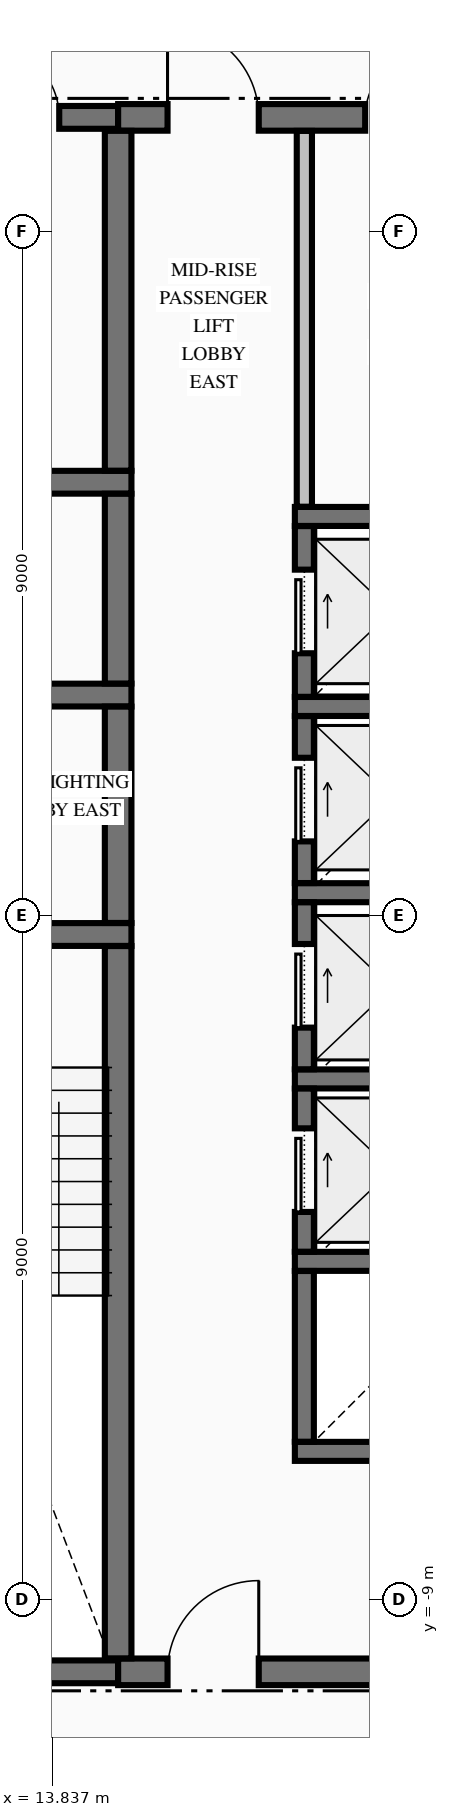
"""IFC4 building model, lengths in metres.
Left out: names, types, materials, properties, quantities, classifications, styles, units other than length and angle.
Written with IfcOpenShell. Run it as: python <this file> out.ifc"""

import sys

from ifc_helpers import new_model, si_unit, direction, frame, frame_2d, origin, place, context, subcontext, project, spatial, rectangle, extrude, element, fill, save


model = new_model("IFC4")
c1 = context("Model", 3, precision=1e-05, world=origin(), true_north=direction((0.0, 1.0)))
c2 = subcontext(c1, "Body", "Model", "MODEL_VIEW")
j1 = project(units=[si_unit("LENGTHUNIT", "METRE"), si_unit("PLANEANGLEUNIT", "RADIAN")], contexts=[c1])
p1 = place(None, origin())
s1 = spatial("IfcSite", under=j1, at=p1, CompositionType="ELEMENT")
p2 = place(p1, origin())
s2 = spatial("IfcBuilding", under=s1, at=p2, CompositionType="ELEMENT")
p3 = place(p2, frame((0.0, 0.0, 135.63)))
s3 = spatial("IfcBuildingStorey", under=s2, at=p3, CompositionType="ELEMENT", Elevation=135.63)
p4 = place(p3, frame((11.504, -9.95, 0.0), z_axis=(0.0, 0.0, 1.0), x_axis=(1.0, 0.0, 0.0)))
e1 = element("IfcWall", 1, at=p4, inside=s3, PredefinedType="SHEAR", context=c2, shape_type="SweptSolid", body=[
    extrude(rectangle(XDim=3.196, YDim=0.3, at=frame_2d((1.598, 0.0))), origin(), (0.0, 0.0, 1.0), 3.32),
])
p5 = place(p3, frame((14.7, -9.95, 0.0), z_axis=(0.0, 0.0, 1.0), x_axis=(1.0, 0.0, 0.0)))
e2 = element("IfcWall", 2, at=p5, inside=s3, PredefinedType="SHEAR", context=c2, shape_type="SweptSolid", body=[
    extrude(rectangle(XDim=4.796, YDim=0.35, at=frame_2d((2.398, 0.0))), origin(), (0.0, 0.0, 1.0), 3.32),
])
p6 = place(p5, frame((0.65, 0.0, 0.0)))
e3 = element("IfcOpeningElement", 3, at=p6, cuts=e2, PredefinedType="OPENING", context=c2, shape_type="SweptSolid", body=[
    extrude(rectangle(XDim=1.2, YDim=2.15, at=frame_2d((0.6, 1.075))), frame((0.0, 0.185, 0.0), z_axis=(0.0, -1.0, 0.0), x_axis=(1.0, 0.0, 0.0)), (0.0, 0.0, 1.0), 0.37),
])
for number, where, z_axis, x_axis in (
    (4, (17.025, -7.05, 0.0), (0.0, 0.0, 1.0), (1.0, 0.0, 0.0)),
    (5, (17.025, -4.55, 0.0), (0.0, 0.0, 1.0), (1.0, 0.0, 0.0)),
    (6, (17.025, -2.15, 0.0), (0.0, 0.0, 1.0), (1.0, 0.0, 0.0)),
):
    element("IfcWall", number, at=place(p3, frame(where, z_axis=z_axis, x_axis=x_axis)), inside=s3, PredefinedType="SOLIDWALL", context=c2, shape_type="SweptSolid", body=[
        extrude(rectangle(XDim=3.15, YDim=0.25, at=frame_2d((1.575, 0.0))), origin(), (0.0, 0.0, 1.0), 3.32),
    ])
p7 = place(p3, frame((11.504, -0.25, 0.0), z_axis=(0.0, 0.0, 1.0), x_axis=(1.0, 0.0, 0.0)))
e7 = element("IfcWall", 7, at=p7, inside=s3, PredefinedType="SHEAR", context=c2, shape_type="SweptSolid", body=[
    extrude(rectangle(XDim=3.371, YDim=0.3, at=frame_2d((1.686, 0.0))), origin(), (0.0, 0.0, 1.0), 3.32),
])
p8 = place(p7, frame((1.096, 0.0, 0.0)))
e8 = element("IfcOpeningElement", 8, at=p8, cuts=e7, PredefinedType="OPENING", context=c2, shape_type="SweptSolid", body=[
    extrude(rectangle(XDim=1.1, YDim=2.15, at=frame_2d((0.55, 1.075))), frame((0.0, 0.16, 0.0), z_axis=(0.0, -1.0, 0.0), x_axis=(1.0, 0.0, 0.0)), (0.0, 0.0, 1.0), 0.32),
])
p9 = place(p3, frame((17.025, 0.3, 0.0), z_axis=(0.0, 0.0, 1.0), x_axis=(1.0, 0.0, 0.0)))
e9 = element("IfcWall", 9, at=p9, inside=s3, PredefinedType="SOLIDWALL", context=c2, shape_type="SweptSolid", body=[
    extrude(rectangle(XDim=2.471, YDim=0.25, at=frame_2d((1.236, 0.0))), origin(), (0.0, 0.0, 1.0), 3.32),
])
p10 = place(p3, frame((17.025, 2.75, 0.0), z_axis=(0.0, 0.0, 1.0), x_axis=(1.0, 0.0, 0.0)))
e10 = element("IfcWall", 10, at=p10, inside=s3, PredefinedType="SOLIDWALL", context=c2, shape_type="SweptSolid", body=[
    extrude(rectangle(XDim=3.15, YDim=0.25, at=frame_2d((1.575, 0.0))), origin(), (0.0, 0.0, 1.0), 3.32),
])
p11 = place(p3, frame((10.85, 2.9, 0.0), z_axis=(0.0, 0.0, 1.0), x_axis=(1.0, 0.0, 0.0)))
e11 = element("IfcWall", 11, at=p11, inside=s3, PredefinedType="SHEAR", context=c2, shape_type="SweptSolid", body=[
    extrude(rectangle(XDim=4.025, YDim=0.3, at=frame_2d((2.012, 0.0))), origin(), (0.0, 0.0, 1.0), 3.32),
])
p12 = place(p11, frame((0.85, 0.0, 0.0)))
e12 = element("IfcOpeningElement", 12, at=p12, cuts=e11, PredefinedType="OPENING", context=c2, shape_type="SweptSolid", body=[
    extrude(rectangle(XDim=1.1, YDim=2.2, at=frame_2d((0.55, 1.1))), frame((0.0, 0.16, 0.0), z_axis=(0.0, -1.0, 0.0), x_axis=(1.0, 0.0, 0.0)), (0.0, 0.0, 1.0), 0.32),
])
p13 = place(p3, frame((17.025, 5.25, 0.0), z_axis=(0.0, 0.0, 1.0), x_axis=(1.0, 0.0, 0.0)))
e13 = element("IfcWall", 13, at=p13, inside=s3, PredefinedType="SOLIDWALL", context=c2, shape_type="SweptSolid", body=[
    extrude(rectangle(XDim=3.15, YDim=0.25, at=frame_2d((1.575, 0.0))), origin(), (0.0, 0.0, 1.0), 3.32),
])
p14 = place(p3, frame((10.85, 5.7, 0.0), z_axis=(0.0, 0.0, 1.0), x_axis=(1.0, 0.0, 0.0)))
e14 = element("IfcWall", 14, at=p14, inside=s3, PredefinedType="SHEAR", context=c2, shape_type="SweptSolid", body=[
    extrude(rectangle(XDim=4.025, YDim=0.3, at=frame_2d((2.012, 0.0))), origin(), (0.0, 0.0, 1.0), 3.32),
])
p15 = place(p3, frame((11.504, 10.5, 0.0), z_axis=(0.0, 0.0, 1.0), x_axis=(1.0, 0.0, 0.0)))
e15 = element("IfcWall", 15, at=p15, inside=s3, PredefinedType="SHEAR", context=c2, shape_type="SweptSolid", body=[
    extrude(rectangle(XDim=3.196, YDim=0.3, at=frame_2d((1.598, 0.0))), origin(), (0.0, 0.0, 1.0), 3.32),
])
p16 = place(p15, frame((1.471, 0.0, 0.0)))
e16 = element("IfcOpeningElement", 16, at=p16, cuts=e15, PredefinedType="OPENING", context=c2, shape_type="SweptSolid", body=[
    extrude(rectangle(XDim=0.95, YDim=2.15, at=frame_2d((0.475, 1.075))), frame((0.0, 0.16, 0.0), z_axis=(0.0, -1.0, 0.0), x_axis=(1.0, 0.0, 0.0)), (0.0, 0.0, 1.0), 0.32),
])
p17 = place(p3, frame((14.7, 10.5, 0.0), z_axis=(0.0, 0.0, 1.0), x_axis=(1.0, 0.0, 0.0)))
e17 = element("IfcWall", 17, at=p17, inside=s3, PredefinedType="SHEAR", context=c2, shape_type="SweptSolid", body=[
    extrude(rectangle(XDim=4.796, YDim=0.35, at=frame_2d((2.398, 0.0))), origin(), (0.0, 0.0, 1.0), 3.32),
])
p18 = place(p17, frame((0.65, 0.0, 0.0)))
e18 = element("IfcOpeningElement", 18, at=p18, cuts=e17, PredefinedType="OPENING", context=c2, shape_type="SweptSolid", body=[
    extrude(rectangle(XDim=1.2, YDim=2.15, at=frame_2d((0.6, 1.075))), frame((0.0, 0.185, 0.0), z_axis=(0.0, -1.0, 0.0), x_axis=(1.0, 0.0, 0.0)), (0.0, 0.0, 1.0), 0.37),
])
p19 = place(p17, frame((3.25, 0.0, 0.0)))
e19 = element("IfcOpeningElement", 19, at=p19, cuts=e17, PredefinedType="OPENING", context=c2, shape_type="SweptSolid", body=[
    extrude(rectangle(XDim=0.9, YDim=2.15, at=frame_2d((0.45, 1.075))), frame((0.0, 0.185, 0.0), z_axis=(0.0, -1.0, 0.0), x_axis=(1.0, 0.0, 0.0)), (0.0, 0.0, 1.0), 0.37),
])
p20 = place(p3, frame((14.7, -9.773, 0.0), z_axis=(0.0, 0.0, 1.0), x_axis=(0.0, 1.0, 0.0)))
e20 = element("IfcWall", 20, at=p20, inside=s3, PredefinedType="SHEAR", context=c2, shape_type="SweptSolid", body=[
    extrude(rectangle(XDim=9.371, YDim=0.35, at=frame_2d((4.686, 0.0))), origin(), (0.0, 0.0, 1.0), 3.32),
])
p21 = place(p3, frame((14.7, -0.098, 0.0), z_axis=(0.0, 0.0, 1.0), x_axis=(0.0, 1.0, 0.0)))
e21 = element("IfcWall", 21, at=p21, inside=s3, PredefinedType="SHEAR", context=c2, shape_type="SweptSolid", body=[
    extrude(rectangle(XDim=2.846, YDim=0.35, at=frame_2d((1.423, 0.0))), origin(), (0.0, 0.0, 1.0), 3.32),
])
p22 = place(p3, frame((14.7, 3.052, 0.0), z_axis=(0.0, 0.0, 1.0), x_axis=(0.0, 1.0, 0.0)))
e22 = element("IfcWall", 22, at=p22, inside=s3, PredefinedType="SHEAR", context=c2, shape_type="SweptSolid", body=[
    extrude(rectangle(XDim=2.496, YDim=0.35, at=frame_2d((1.248, 0.0))), origin(), (0.0, 0.0, 1.0), 3.32),
])
p23 = place(p3, frame((14.7, 5.852, 0.0), z_axis=(0.0, 0.0, 1.0), x_axis=(0.0, 1.0, 0.0)))
e23 = element("IfcWall", 23, at=p23, inside=s3, PredefinedType="SHEAR", context=c2, shape_type="SweptSolid", body=[
    extrude(rectangle(XDim=4.471, YDim=0.35, at=frame_2d((2.235, 0.0))), origin(), (0.0, 0.0, 1.0), 3.32),
])
p24 = place(p3, frame((17.15, -6.923, 0.0), z_axis=(0.0, 0.0, 1.0), x_axis=(0.0, 1.0, 0.0)))
e24 = element("IfcWall", 24, at=p24, inside=s3, PredefinedType="SOLIDWALL", context=c2, shape_type="SweptSolid", body=[
    extrude(rectangle(XDim=2.246, YDim=0.25, at=frame_2d((1.123, 0.0))), origin(), (0.0, 0.0, 1.0), 3.32),
])
p25 = place(p3, frame((17.15, -4.423, 0.0), z_axis=(0.0, 0.0, 1.0), x_axis=(0.0, 1.0, 0.0)))
e25 = element("IfcWall", 25, at=p25, inside=s3, PredefinedType="SOLIDWALL", context=c2, shape_type="SweptSolid", body=[
    extrude(rectangle(XDim=2.146, YDim=0.25, at=frame_2d((1.073, 0.0))), origin(), (0.0, 0.0, 1.0), 3.32),
])
p26 = place(p25, frame((0.523, 0.0, 0.0)))
e26 = element("IfcOpeningElement", 26, at=p26, cuts=e25, PredefinedType="OPENING", context=c2, shape_type="SweptSolid", body=[
    extrude(rectangle(XDim=1.1, YDim=2.2, at=frame_2d((0.55, 1.1))), frame((0.0, 0.135, 0.0), z_axis=(0.0, -1.0, 0.0), x_axis=(1.0, 0.0, 0.0)), (0.0, 0.0, 1.0), 0.27),
])
p27 = place(p3, frame((17.15, -2.023, 0.0), z_axis=(0.0, 0.0, 1.0), x_axis=(0.0, 1.0, 0.0)))
e27 = element("IfcWall", 27, at=p27, inside=s3, PredefinedType="SOLIDWALL", context=c2, shape_type="SweptSolid", body=[
    extrude(rectangle(XDim=2.196, YDim=0.25, at=frame_2d((1.098, 0.0))), origin(), (0.0, 0.0, 1.0), 3.32),
])
p28 = place(p27, frame((0.548, 0.0, 0.0)))
e28 = element("IfcOpeningElement", 28, at=p28, cuts=e27, PredefinedType="OPENING", context=c2, shape_type="SweptSolid", body=[
    extrude(rectangle(XDim=1.1, YDim=2.2, at=frame_2d((0.55, 1.1))), frame((0.0, 0.135, 0.0), z_axis=(0.0, -1.0, 0.0), x_axis=(1.0, 0.0, 0.0)), (0.0, 0.0, 1.0), 0.27),
])
p29 = place(p3, frame((17.15, 0.427, 0.0), z_axis=(0.0, 0.0, 1.0), x_axis=(0.0, 1.0, 0.0)))
e29 = element("IfcWall", 29, at=p29, inside=s3, PredefinedType="SOLIDWALL", context=c2, shape_type="SweptSolid", body=[
    extrude(rectangle(XDim=2.196, YDim=0.25, at=frame_2d((1.098, 0.0))), origin(), (0.0, 0.0, 1.0), 3.32),
])
p30 = place(p29, frame((0.548, 0.0, 0.0)))
e30 = element("IfcOpeningElement", 30, at=p30, cuts=e29, PredefinedType="OPENING", context=c2, shape_type="SweptSolid", body=[
    extrude(rectangle(XDim=1.1, YDim=2.2, at=frame_2d((0.55, 1.1))), frame((0.0, 0.135, 0.0), z_axis=(0.0, -1.0, 0.0), x_axis=(1.0, 0.0, 0.0)), (0.0, 0.0, 1.0), 0.27),
])
p31 = place(p3, frame((17.15, 2.877, 0.0), z_axis=(0.0, 0.0, 1.0), x_axis=(0.0, 1.0, 0.0)))
e31 = element("IfcWall", 31, at=p31, inside=s3, PredefinedType="SOLIDWALL", context=c2, shape_type="SweptSolid", body=[
    extrude(rectangle(XDim=2.246, YDim=0.25, at=frame_2d((1.123, 0.0))), origin(), (0.0, 0.0, 1.0), 3.32),
])
p32 = place(p31, frame((0.573, 0.0, 0.0)))
e32 = element("IfcOpeningElement", 32, at=p32, cuts=e31, PredefinedType="OPENING", context=c2, shape_type="SweptSolid", body=[
    extrude(rectangle(XDim=1.1, YDim=2.2, at=frame_2d((0.55, 1.1))), frame((0.0, 0.135, 0.0), z_axis=(0.0, -1.0, 0.0), x_axis=(1.0, 0.0, 0.0)), (0.0, 0.0, 1.0), 0.27),
])
p33 = place(p3, frame((17.15, 5.378, 0.0), z_axis=(0.0, 0.0, 1.0), x_axis=(0.0, 1.0, 0.0)))
e33 = element("IfcWall", 33, at=p33, inside=s3, PredefinedType="PARTITIONING", context=c2, shape_type="SweptSolid", body=[
    extrude(rectangle(XDim=4.944, YDim=0.2, at=frame_2d((2.472, 0.0))), origin(), (0.0, 0.0, 1.0), 3.32),
])
p34 = place(p16, origin())
e34 = element("IfcDoor", 34, at=p34, inside=s3, OperationType="SINGLE_SWING_LEFT", PredefinedType="DOOR", context=c2, shape_type="SweptSolid", body=[
    extrude(rectangle(XDim=0.95, YDim=2.15, at=frame_2d((0.475, 1.075))), frame((0.0, 0.025, 0.0), z_axis=(0.0, -1.0, 0.0), x_axis=(1.0, 0.0, 0.0)), (0.0, 0.0, 1.0), 0.05),
])
fill(e16, e34)
p35 = place(p26, origin())
e35 = element("IfcDoor", 35, at=p35, inside=s3, OperationType="SLIDING_TO_RIGHT", PredefinedType="DOOR", context=c2, shape_type="SweptSolid", body=[
    extrude(rectangle(XDim=1.1, YDim=2.2, at=frame_2d((0.55, 1.1))), frame((0.0, 0.025, 0.0), z_axis=(0.0, -1.0, 0.0), x_axis=(1.0, 0.0, 0.0)), (0.0, 0.0, 1.0), 0.05),
])
fill(e26, e35)
p36 = place(p28, origin())
e36 = element("IfcDoor", 36, at=p36, inside=s3, OperationType="SLIDING_TO_RIGHT", PredefinedType="DOOR", context=c2, shape_type="SweptSolid", body=[
    extrude(rectangle(XDim=1.1, YDim=2.2, at=frame_2d((0.55, 1.1))), frame((0.0, 0.025, 0.0), z_axis=(0.0, -1.0, 0.0), x_axis=(1.0, 0.0, 0.0)), (0.0, 0.0, 1.0), 0.05),
])
fill(e28, e36)
p37 = place(p30, origin())
e37 = element("IfcDoor", 37, at=p37, inside=s3, OperationType="SLIDING_TO_RIGHT", PredefinedType="DOOR", context=c2, shape_type="SweptSolid", body=[
    extrude(rectangle(XDim=1.1, YDim=2.2, at=frame_2d((0.55, 1.1))), frame((0.0, 0.025, 0.0), z_axis=(0.0, -1.0, 0.0), x_axis=(1.0, 0.0, 0.0)), (0.0, 0.0, 1.0), 0.05),
])
fill(e30, e37)
p38 = place(p32, origin())
e38 = element("IfcDoor", 38, at=p38, inside=s3, OperationType="SLIDING_TO_RIGHT", PredefinedType="DOOR", context=c2, shape_type="SweptSolid", body=[
    extrude(rectangle(XDim=1.1, YDim=2.2, at=frame_2d((0.55, 1.1))), frame((0.0, 0.025, 0.0), z_axis=(0.0, -1.0, 0.0), x_axis=(1.0, 0.0, 0.0)), (0.0, 0.0, 1.0), 0.05),
])
fill(e32, e38)
p39 = place(p6, origin())
e39 = element("IfcDoor", 39, at=p39, inside=s3, OperationType="SINGLE_SWING_RIGHT", PredefinedType="DOOR", context=c2, shape_type="SweptSolid", body=[
    extrude(rectangle(XDim=1.2, YDim=2.15, at=frame_2d((0.6, 1.075))), frame((0.0, 0.025, 0.0), z_axis=(0.0, -1.0, 0.0), x_axis=(1.0, 0.0, 0.0)), (0.0, 0.0, 1.0), 0.05),
])
fill(e3, e39)
p40 = place(p18, origin())
e40 = element("IfcDoor", 40, at=p40, inside=s3, OperationType="SINGLE_SWING_LEFT", PredefinedType="DOOR", context=c2, shape_type="SweptSolid", body=[
    extrude(rectangle(XDim=1.2, YDim=2.15, at=frame_2d((0.6, 1.075))), frame((0.0, 0.025, 0.0), z_axis=(0.0, -1.0, 0.0), x_axis=(1.0, 0.0, 0.0)), (0.0, 0.0, 1.0), 0.05),
])
fill(e18, e40)
p41 = place(p19, origin())
e41 = element("IfcDoor", 41, at=p41, inside=s3, OperationType="SINGLE_SWING_RIGHT", PredefinedType="DOOR", context=c2, shape_type="SweptSolid", body=[
    extrude(rectangle(XDim=0.9, YDim=2.15, at=frame_2d((0.45, 1.075))), frame((0.0, 0.025, 0.0), z_axis=(0.0, -1.0, 0.0), x_axis=(1.0, 0.0, 0.0)), (0.0, 0.0, 1.0), 0.05),
])
fill(e19, e41)
save(model, sys.argv[1])
